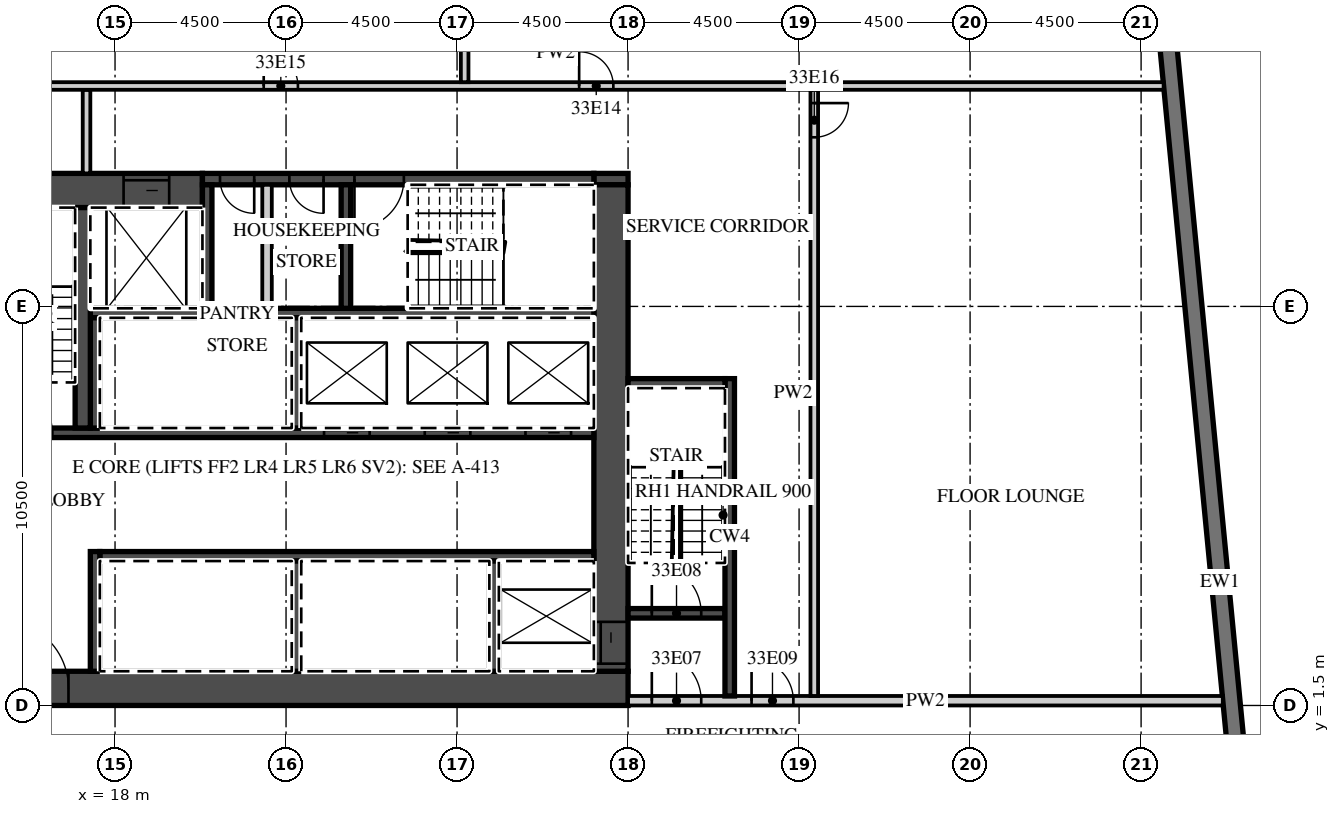
"""IFC4 building model, lengths in metres.
Left out: names, types, materials, properties, quantities, classifications, styles, units other than length and angle.
Written with IfcOpenShell. Run it as: python <this file> out.ifc"""

import sys

from ifc_helpers import new_model, si_unit, direction, frame, frame_2d, origin, place, context, subcontext, project, spatial, rectangle, extrude, element, fill, save


model = new_model("IFC4")
c1 = context("Model", 3, precision=1e-05, world=origin(), true_north=direction((0.0, 1.0)))
c2 = subcontext(c1, "Body", "Model", "MODEL_VIEW")
j1 = project(units=[si_unit("LENGTHUNIT", "METRE"), si_unit("PLANEANGLEUNIT", "RADIAN")], contexts=[c1])
p1 = place(None, origin())
s1 = spatial("IfcSite", under=j1, at=p1, CompositionType="ELEMENT")
p2 = place(p1, origin())
s2 = spatial("IfcBuilding", under=s1, at=p2, CompositionType="ELEMENT")
p3 = place(p2, frame((0.0, 0.0, 143.8)))
s3 = spatial("IfcBuildingStorey", under=s2, at=p3, CompositionType="ELEMENT", Elevation=143.8)
p4 = place(p3, frame((48.753, -12.672, 0.0), z_axis=(0.0, 0.0, 1.0), x_axis=(-0.095842661909, 0.995396495954, 0.0)))
e1 = element("IfcWall", 1, at=p4, inside=s3, PredefinedType="SOLIDWALL", context=c2, shape_type="SweptSolid", body=[
    extrude(rectangle(XDim=35.0, YDim=0.45, at=frame_2d((17.5, 0.0))), origin(), (0.0, 0.0, 1.0), 3.02),
])
p5 = place(p4, frame((3.072, 0.0, 0.45)))
e2 = element("IfcOpeningElement", 2, at=p5, cuts=e1, PredefinedType="OPENING", context=c2, shape_type="SweptSolid", body=[
    extrude(rectangle(XDim=3.3, YDim=2.25, at=frame_2d((1.65, 1.125))), frame((0.0, 0.235, 0.0), z_axis=(0.0, -1.0, 0.0), x_axis=(1.0, 0.0, 0.0)), (0.0, 0.0, 1.0), 0.47),
])
p6 = place(p4, frame((7.593, 0.0, 0.45)))
e3 = element("IfcOpeningElement", 3, at=p6, cuts=e1, PredefinedType="OPENING", context=c2, shape_type="SweptSolid", body=[
    extrude(rectangle(XDim=3.3, YDim=2.25, at=frame_2d((1.65, 1.125))), frame((0.0, 0.235, 0.0), z_axis=(0.0, -1.0, 0.0), x_axis=(1.0, 0.0, 0.0)), (0.0, 0.0, 1.0), 0.47),
])
p7 = place(p3, frame((13.5, 1.95, 0.0), z_axis=(0.0, 0.0, 1.0), x_axis=(1.0, 0.0, 0.0)))
e4 = element("IfcWall", 4, at=p7, inside=s3, PredefinedType="SHEAR", context=c2, shape_type="SweptSolid", body=[
    extrude(rectangle(XDim=18.0, YDim=0.9, at=frame_2d((9.0, 0.0))), origin(), (0.0, 0.0, 1.0), 3.02),
])
p8 = place(p7, frame((1.475, 0.0, 0.0)))
e5 = element("IfcOpeningElement", 5, at=p8, cuts=e4, PredefinedType="OPENING", context=c2, shape_type="SweptSolid", body=[
    extrude(rectangle(XDim=1.8, YDim=2.1, at=frame_2d((0.9, 1.05))), frame((0.0, 0.46, 0.0), z_axis=(0.0, -1.0, 0.0), x_axis=(1.0, 0.0, 0.0)), (0.0, 0.0, 1.0), 0.92),
])
p9 = place(p3, frame((13.5, 15.05, 0.0), z_axis=(0.0, 0.0, 1.0), x_axis=(1.0, 0.0, 0.0)))
e6 = element("IfcWall", 6, at=p9, inside=s3, PredefinedType="SHEAR", context=c2, shape_type="SweptSolid", body=[
    extrude(rectangle(XDim=6.8, YDim=0.9, at=frame_2d((3.4, 0.0))), origin(), (0.0, 0.0, 1.0), 3.02),
])
p10 = place(p9, frame((4.725, 0.0, 0.0)))
e7 = element("IfcOpeningElement", 7, at=p10, cuts=e6, PredefinedType="OPENING", context=c2, shape_type="SweptSolid", body=[
    extrude(rectangle(XDim=1.2, YDim=2.1, at=frame_2d((0.6, 1.05))), frame((0.0, 0.46, 0.0), z_axis=(0.0, -1.0, 0.0), x_axis=(1.0, 0.0, 0.0)), (0.0, 0.0, 1.0), 0.92),
])
p11 = place(p3, frame((30.6, 15.35, 0.0), z_axis=(0.0, 0.0, 1.0), x_axis=(1.0, 0.0, 0.0)))
e8 = element("IfcWall", 8, at=p11, inside=s3, PredefinedType="SHEAR", context=c2, shape_type="SweptSolid", body=[
    extrude(rectangle(XDim=0.9, YDim=0.3, at=frame_2d((0.45, 0.0))), origin(), (0.0, 0.0, 1.0), 3.02),
])
p12 = place(p3, frame((20.3, 15.35, 0.0), z_axis=(0.0, 0.0, 1.0), x_axis=(1.0, 0.0, 0.0)))
e9 = element("IfcWall", 9, at=p12, inside=s3, PredefinedType="SHEAR", context=c2, shape_type="SweptSolid", body=[
    extrude(rectangle(XDim=10.3, YDim=0.3, at=frame_2d((5.15, 0.0))), origin(), (0.0, 0.0, 1.0), 3.02),
])
p13 = place(p12, frame((4.0, 0.0, 0.0)))
e10 = element("IfcOpeningElement", 10, at=p13, cuts=e9, PredefinedType="OPENING", context=c2, shape_type="SweptSolid", body=[
    extrude(rectangle(XDim=1.3, YDim=2.1, at=frame_2d((0.65, 1.05))), frame((0.0, 0.16, 0.0), z_axis=(0.0, -1.0, 0.0), x_axis=(1.0, 0.0, 0.0)), (0.0, 0.0, 1.0), 0.32),
])
p14 = place(p12, frame((2.288, 0.0, 0.0)))
e11 = element("IfcOpeningElement", 11, at=p14, cuts=e9, PredefinedType="OPENING", context=c2, shape_type="SweptSolid", body=[
    extrude(rectangle(XDim=0.9, YDim=2.1, at=frame_2d((0.45, 1.05))), frame((0.0, 0.16, 0.0), z_axis=(0.0, -1.0, 0.0), x_axis=(1.0, 0.0, 0.0)), (0.0, 0.0, 1.0), 0.32),
])
p15 = place(p12, frame((0.462, 0.0, 0.0)))
e12 = element("IfcOpeningElement", 12, at=p15, cuts=e9, PredefinedType="OPENING", context=c2, shape_type="SweptSolid", body=[
    extrude(rectangle(XDim=0.9, YDim=2.1, at=frame_2d((0.45, 1.05))), frame((0.0, 0.16, 0.0), z_axis=(0.0, -1.0, 0.0), x_axis=(1.0, 0.0, 0.0)), (0.0, 0.0, 1.0), 0.32),
])
p16 = place(p3, frame((31.05, 2.4, 0.0), z_axis=(0.0, 0.0, 1.0), x_axis=(0.0, 1.0, 0.0)))
e13 = element("IfcWall", 13, at=p16, inside=s3, PredefinedType="SHEAR", context=c2, shape_type="SweptSolid", body=[
    extrude(rectangle(XDim=12.8, YDim=0.9, at=frame_2d((6.4, 0.0))), origin(), (0.0, 0.0, 1.0), 3.02),
])
p17 = place(p16, frame((0.2, 0.0, 0.0)))
e14 = element("IfcOpeningElement", 14, at=p17, cuts=e13, PredefinedType="OPENING", context=c2, shape_type="SweptSolid", body=[
    extrude(rectangle(XDim=1.1, YDim=2.1, at=frame_2d((0.55, 1.05))), frame((0.0, 0.46, 0.0), z_axis=(0.0, -1.0, 0.0), x_axis=(1.0, 0.0, 0.0)), (0.0, 0.0, 1.0), 0.92),
])
p18 = place(p3, frame((17.6, 5.425, 0.0), z_axis=(0.0, 0.0, 1.0), x_axis=(1.0, 0.0, 0.0)))
e15 = element("IfcWall", 15, at=p18, inside=s3, PredefinedType="SHEAR", context=c2, shape_type="SweptSolid", body=[
    extrude(rectangle(XDim=13.0, YDim=0.25, at=frame_2d((6.5, 0.0))), origin(), (0.0, 0.0, 1.0), 3.02),
])
p19 = place(p3, frame((17.475, 2.4, 0.0), z_axis=(0.0, 0.0, 1.0), x_axis=(0.0, 1.0, 0.0)))
e16 = element("IfcWall", 16, at=p19, inside=s3, PredefinedType="SHEAR", context=c2, shape_type="SweptSolid", body=[
    extrude(rectangle(XDim=3.15, YDim=0.25, at=frame_2d((1.575, 0.0))), origin(), (0.0, 0.0, 1.0), 3.02),
])
for number, where, z_axis, x_axis in (
    (17, (27.975, 2.4, 0.0), (0.0, 0.0, 1.0), (0.0, 1.0, 0.0)),
    (18, (22.775, 2.4, 0.0), (0.0, 0.0, 1.0), (0.0, 1.0, 0.0)),
):
    element("IfcWall", number, at=place(p3, frame(where, z_axis=z_axis, x_axis=x_axis)), inside=s3, PredefinedType="SHEAR", context=c2, shape_type="SweptSolid", body=[
        extrude(rectangle(XDim=2.9, YDim=0.25, at=frame_2d((1.45, 0.0))), origin(), (0.0, 0.0, 1.0), 3.02),
    ])
p20 = place(p3, frame((14.4, 8.675, 0.0), z_axis=(0.0, 0.0, 1.0), x_axis=(1.0, 0.0, 0.0)))
e19 = element("IfcWall", 19, at=p20, inside=s3, PredefinedType="SHEAR", context=c2, shape_type="SweptSolid", body=[
    extrude(rectangle(XDim=16.2, YDim=0.25, at=frame_2d((8.1, 0.0))), origin(), (0.0, 0.0, 1.0), 3.02),
])
p21 = place(p20, frame((14.4, 0.0, 0.0)))
e20 = element("IfcOpeningElement", 20, at=p21, cuts=e19, PredefinedType="OPENING", context=c2, shape_type="SweptSolid", body=[
    extrude(rectangle(XDim=1.2, YDim=2.1, at=frame_2d((0.6, 1.05))), frame((0.0, 0.135, 0.0), z_axis=(0.0, -1.0, 0.0), x_axis=(1.0, 0.0, 0.0)), (0.0, 0.0, 1.0), 0.27),
])
p22 = place(p20, frame((11.75, 0.0, 0.0)))
e21 = element("IfcOpeningElement", 21, at=p22, cuts=e19, PredefinedType="OPENING", context=c2, shape_type="SweptSolid", body=[
    extrude(rectangle(XDim=1.2, YDim=2.1, at=frame_2d((0.6, 1.05))), frame((0.0, 0.135, 0.0), z_axis=(0.0, -1.0, 0.0), x_axis=(1.0, 0.0, 0.0)), (0.0, 0.0, 1.0), 0.27),
])
p23 = place(p20, frame((9.1, 0.0, 0.0)))
e22 = element("IfcOpeningElement", 22, at=p23, cuts=e19, PredefinedType="OPENING", context=c2, shape_type="SweptSolid", body=[
    extrude(rectangle(XDim=1.2, YDim=2.1, at=frame_2d((0.6, 1.05))), frame((0.0, 0.135, 0.0), z_axis=(0.0, -1.0, 0.0), x_axis=(1.0, 0.0, 0.0)), (0.0, 0.0, 1.0), 0.27),
])
p24 = place(p20, frame((0.65, 0.0, 0.0)))
e23 = element("IfcOpeningElement", 23, at=p24, cuts=e19, PredefinedType="OPENING", context=c2, shape_type="SweptSolid", body=[
    extrude(rectangle(XDim=1.3, YDim=2.1, at=frame_2d((0.65, 1.05))), frame((0.0, 0.135, 0.0), z_axis=(0.0, -1.0, 0.0), x_axis=(1.0, 0.0, 0.0)), (0.0, 0.0, 1.0), 0.27),
])
p25 = place(p3, frame((17.35, 11.825, 0.0), z_axis=(0.0, 0.0, 1.0), x_axis=(1.0, 0.0, 0.0)))
e24 = element("IfcWall", 24, at=p25, inside=s3, PredefinedType="SHEAR", context=c2, shape_type="SweptSolid", body=[
    extrude(rectangle(XDim=13.25, YDim=0.25, at=frame_2d((6.625, 0.0))), origin(), (0.0, 0.0, 1.0), 3.02),
])
for number, where, z_axis, x_axis in (
    (25, (17.475, 8.8, 0.0), (0.0, 0.0, 1.0), (0.0, 1.0, 0.0)),
    (26, (22.775, 8.8, 0.0), (0.0, 0.0, 1.0), (0.0, 1.0, 0.0)),
):
    element("IfcWall", number, at=place(p3, frame(where, z_axis=z_axis, x_axis=x_axis)), inside=s3, PredefinedType="SHEAR", context=c2, shape_type="SweptSolid", body=[
        extrude(rectangle(XDim=2.9, YDim=0.25, at=frame_2d((1.45, 0.0))), origin(), (0.0, 0.0, 1.0), 3.02),
    ])
p26 = place(p3, frame((17.15, 8.8, 0.0), z_axis=(0.0, 0.0, 1.0), x_axis=(0.0, 1.0, 0.0)))
e27 = element("IfcWall", 27, at=p26, inside=s3, PredefinedType="SHEAR", context=c2, shape_type="SweptSolid", body=[
    extrude(rectangle(XDim=5.8, YDim=0.4, at=frame_2d((2.9, 0.0))), origin(), (0.0, 0.0, 1.0), 3.02),
])
for number, where, z_axis, x_axis in (
    (28, (20.425, 11.95, 0.0), (0.0, 0.0, 1.0), (0.0, 1.0, 0.0)),
    (29, (24.075, 11.95, 0.0), (0.0, 0.0, 1.0), (0.0, 1.0, 0.0)),
):
    element("IfcWall", number, at=place(p3, frame(where, z_axis=z_axis, x_axis=x_axis)), inside=s3, PredefinedType="SHEAR", context=c2, shape_type="SweptSolid", body=[
        extrude(rectangle(XDim=3.25, YDim=0.25, at=frame_2d((1.625, 0.0))), origin(), (0.0, 0.0, 1.0), 3.02),
    ])
p27 = place(p3, frame((22.0, 11.95, 0.0), z_axis=(0.0, 0.0, 1.0), x_axis=(0.0, 1.0, 0.0)))
e30 = element("IfcWall", 30, at=p27, inside=s3, PredefinedType="PARTITIONING", context=c2, shape_type="SweptSolid", body=[
    extrude(rectangle(XDim=3.25, YDim=0.25, at=frame_2d((1.625, 0.0))), origin(), (0.0, 0.0, 1.0), 3.02),
])
p28 = place(p3, frame((31.5, 1.625, 0.0), z_axis=(0.0, 0.0, 1.0), x_axis=(1.0, 0.0, 0.0)))
e31 = element("IfcWall", 31, at=p28, inside=s3, PredefinedType="PARTITIONING", context=c2, shape_type="SweptSolid", body=[
    extrude(rectangle(XDim=15.65, YDim=0.25, at=frame_2d((7.825, 0.0))), origin(), (0.0, 0.0, 1.0), 3.02),
])
p29 = place(p28, frame((0.625, 0.0, 0.0)))
e32 = element("IfcOpeningElement", 32, at=p29, cuts=e31, PredefinedType="OPENING", context=c2, shape_type="SweptSolid", body=[
    extrude(rectangle(XDim=1.3, YDim=2.1, at=frame_2d((0.65, 1.05))), frame((0.0, 0.135, 0.0), z_axis=(0.0, -1.0, 0.0), x_axis=(1.0, 0.0, 0.0)), (0.0, 0.0, 1.0), 0.27),
])
p30 = place(p28, frame((3.25, 0.0, 0.0)))
e33 = element("IfcOpeningElement", 33, at=p30, cuts=e31, PredefinedType="OPENING", context=c2, shape_type="SweptSolid", body=[
    extrude(rectangle(XDim=1.1, YDim=2.1, at=frame_2d((0.55, 1.05))), frame((0.0, 0.135, 0.0), z_axis=(0.0, -1.0, 0.0), x_axis=(1.0, 0.0, 0.0)), (0.0, 0.0, 1.0), 0.27),
])
p31 = place(p3, frame((31.5, 3.925, 0.0), z_axis=(0.0, 0.0, 1.0), x_axis=(1.0, 0.0, 0.0)))
e34 = element("IfcWall", 34, at=p31, inside=s3, PredefinedType="SHEAR", context=c2, shape_type="SweptSolid", body=[
    extrude(rectangle(XDim=2.55, YDim=0.25, at=frame_2d((1.275, 0.0))), origin(), (0.0, 0.0, 1.0), 3.02),
])
p32 = place(p31, frame((0.625, 0.0, 0.0)))
e35 = element("IfcOpeningElement", 35, at=p32, cuts=e34, PredefinedType="OPENING", context=c2, shape_type="SweptSolid", body=[
    extrude(rectangle(XDim=1.3, YDim=2.1, at=frame_2d((0.65, 1.05))), frame((0.0, 0.135, 0.0), z_axis=(0.0, -1.0, 0.0), x_axis=(1.0, 0.0, 0.0)), (0.0, 0.0, 1.0), 0.27),
])
p33 = place(p3, frame((34.175, 1.75, 0.0), z_axis=(0.0, 0.0, 1.0), x_axis=(0.0, 1.0, 0.0)))
e36 = element("IfcWall", 36, at=p33, inside=s3, PredefinedType="SHEAR", context=c2, shape_type="SweptSolid", body=[
    extrude(rectangle(XDim=8.35, YDim=0.25, at=frame_2d((4.175, 0.0))), origin(), (0.0, 0.0, 1.0), 3.02),
])
p34 = place(p3, frame((31.5, 9.975, 0.0), z_axis=(0.0, 0.0, 1.0), x_axis=(1.0, 0.0, 0.0)))
e37 = element("IfcWall", 37, at=p34, inside=s3, PredefinedType="SHEAR", context=c2, shape_type="SweptSolid", body=[
    extrude(rectangle(XDim=2.55, YDim=0.25, at=frame_2d((1.275, 0.0))), origin(), (0.0, 0.0, 1.0), 3.02),
])
p35 = place(p3, frame((17.25, 15.5, 0.0), z_axis=(0.0, 0.0, 1.0), x_axis=(0.0, 1.0, 0.0)))
e38 = element("IfcWall", 38, at=p35, inside=s3, PredefinedType="PARTITIONING", context=c2, shape_type="SweptSolid", body=[
    extrude(rectangle(XDim=2.2, YDim=0.2, at=frame_2d((1.1, 0.0))), origin(), (0.0, 0.0, 1.0), 3.02),
])
p36 = place(p3, frame((36.4, 1.75, 0.0), z_axis=(0.0, 0.0, 1.0), x_axis=(0.0, 1.0, 0.0)))
e39 = element("IfcWall", 39, at=p36, inside=s3, PredefinedType="PARTITIONING", context=c2, shape_type="SweptSolid", body=[
    extrude(rectangle(XDim=15.95, YDim=0.2, at=frame_2d((7.975, 0.0))), origin(), (0.0, 0.0, 1.0), 3.02),
])
p37 = place(p36, frame((14.7, 0.0, 0.0)))
e40 = element("IfcOpeningElement", 40, at=p37, cuts=e39, PredefinedType="OPENING", context=c2, shape_type="SweptSolid", body=[
    extrude(rectangle(XDim=0.9, YDim=2.1, at=frame_2d((0.45, 1.05))), frame((0.0, 0.11, 0.0), z_axis=(0.0, -1.0, 0.0), x_axis=(1.0, 0.0, 0.0)), (0.0, 0.0, 1.0), 0.22),
])
p38 = place(p3, frame((13.6, 17.8, 0.0), z_axis=(0.0, 0.0, 1.0), x_axis=(1.0, 0.0, 0.0)))
e41 = element("IfcWall", 41, at=p38, inside=s3, PredefinedType="PARTITIONING", context=c2, shape_type="SweptSolid", body=[
    extrude(rectangle(XDim=31.993, YDim=0.2, at=frame_2d((15.997, 0.0))), origin(), (0.0, 0.0, 1.0), 3.02),
])
p39 = place(p38, frame((16.613, 0.0, 0.0)))
e42 = element("IfcOpeningElement", 42, at=p39, cuts=e41, PredefinedType="OPENING", context=c2, shape_type="SweptSolid", body=[
    extrude(rectangle(XDim=0.9, YDim=2.1, at=frame_2d((0.45, 1.05))), frame((0.0, 0.11, 0.0), z_axis=(0.0, -1.0, 0.0), x_axis=(1.0, 0.0, 0.0)), (0.0, 0.0, 1.0), 0.22),
])
p40 = place(p38, frame((8.312, 0.0, 0.0)))
e43 = element("IfcOpeningElement", 43, at=p40, cuts=e41, PredefinedType="OPENING", context=c2, shape_type="SweptSolid", body=[
    extrude(rectangle(XDim=0.9, YDim=2.1, at=frame_2d((0.45, 1.05))), frame((0.0, 0.11, 0.0), z_axis=(0.0, -1.0, 0.0), x_axis=(1.0, 0.0, 0.0)), (0.0, 0.0, 1.0), 0.22),
])
p41 = place(p3, frame((27.2, 17.9, 0.0), z_axis=(0.0, 0.0, 1.0), x_axis=(0.0, 1.0, 0.0)))
e44 = element("IfcWall", 44, at=p41, inside=s3, PredefinedType="PARTITIONING", context=c2, shape_type="SweptSolid", body=[
    extrude(rectangle(XDim=6.082, YDim=0.2, at=frame_2d((3.041, 0.0))), origin(), (0.0, 0.0, 1.0), 3.02),
])
p42 = place(p21, origin())
e45 = element("IfcDoor", 45, at=p42, inside=s3, OperationType="SLIDING_TO_LEFT", PredefinedType="DOOR", context=c2, shape_type="SweptSolid", body=[
    extrude(rectangle(XDim=1.2, YDim=2.1, at=frame_2d((0.6, 1.05))), frame((0.0, 0.025, 0.0), z_axis=(0.0, -1.0, 0.0), x_axis=(1.0, 0.0, 0.0)), (0.0, 0.0, 1.0), 0.05),
])
fill(e20, e45)
p43 = place(p22, origin())
e46 = element("IfcDoor", 46, at=p43, inside=s3, OperationType="SLIDING_TO_RIGHT", PredefinedType="DOOR", context=c2, shape_type="SweptSolid", body=[
    extrude(rectangle(XDim=1.2, YDim=2.1, at=frame_2d((0.6, 1.05))), frame((0.0, 0.025, 0.0), z_axis=(0.0, -1.0, 0.0), x_axis=(1.0, 0.0, 0.0)), (0.0, 0.0, 1.0), 0.05),
])
fill(e21, e46)
p44 = place(p23, origin())
e47 = element("IfcDoor", 47, at=p44, inside=s3, OperationType="SLIDING_TO_RIGHT", PredefinedType="DOOR", context=c2, shape_type="SweptSolid", body=[
    extrude(rectangle(XDim=1.2, YDim=2.1, at=frame_2d((0.6, 1.05))), frame((0.0, 0.025, 0.0), z_axis=(0.0, -1.0, 0.0), x_axis=(1.0, 0.0, 0.0)), (0.0, 0.0, 1.0), 0.05),
])
fill(e22, e47)
p45 = place(p10, origin())
e48 = element("IfcDoor", 48, at=p45, inside=s3, OperationType="SLIDING_TO_LEFT", PredefinedType="DOOR", context=c2, shape_type="SweptSolid", body=[
    extrude(rectangle(XDim=1.2, YDim=2.1, at=frame_2d((0.6, 1.05))), frame((0.0, 0.025, 0.0), z_axis=(0.0, -1.0, 0.0), x_axis=(1.0, 0.0, 0.0)), (0.0, 0.0, 1.0), 0.05),
])
fill(e7, e48)
p46 = place(p17, origin())
e49 = element("IfcDoor", 49, at=p46, inside=s3, OperationType="SLIDING_TO_LEFT", PredefinedType="DOOR", context=c2, shape_type="SweptSolid", body=[
    extrude(rectangle(XDim=1.1, YDim=2.1, at=frame_2d((0.55, 1.05))), frame((0.0, 0.025, 0.0), z_axis=(0.0, -1.0, 0.0), x_axis=(1.0, 0.0, 0.0)), (0.0, 0.0, 1.0), 0.05),
])
fill(e14, e49)
p47 = place(p8, origin())
e50 = element("IfcDoor", 50, at=p47, inside=s3, OperationType="DOUBLE_DOOR_DOUBLE_SWING", PredefinedType="DOOR", context=c2, shape_type="SweptSolid", body=[
    extrude(rectangle(XDim=1.8, YDim=2.1, at=frame_2d((0.9, 1.05))), frame((0.0, 0.025, 0.0), z_axis=(0.0, -1.0, 0.0), x_axis=(1.0, 0.0, 0.0)), (0.0, 0.0, 1.0), 0.05),
])
fill(e5, e50)
p48 = place(p29, origin())
e51 = element("IfcDoor", 51, at=p48, inside=s3, OperationType="SINGLE_SWING_LEFT", PredefinedType="DOOR", context=c2, shape_type="SweptSolid", body=[
    extrude(rectangle(XDim=1.3, YDim=2.1, at=frame_2d((0.65, 1.05))), frame((0.0, 0.025, 0.0), z_axis=(0.0, -1.0, 0.0), x_axis=(1.0, 0.0, 0.0)), (0.0, 0.0, 1.0), 0.05),
])
fill(e32, e51)
p49 = place(p32, origin())
e52 = element("IfcDoor", 52, at=p49, inside=s3, OperationType="SINGLE_SWING_LEFT", PredefinedType="DOOR", context=c2, shape_type="SweptSolid", body=[
    extrude(rectangle(XDim=1.3, YDim=2.1, at=frame_2d((0.65, 1.05))), frame((0.0, 0.025, 0.0), z_axis=(0.0, -1.0, 0.0), x_axis=(1.0, 0.0, 0.0)), (0.0, 0.0, 1.0), 0.05),
])
fill(e35, e52)
p50 = place(p30, origin())
e53 = element("IfcDoor", 53, at=p50, inside=s3, OperationType="SINGLE_SWING_LEFT", PredefinedType="DOOR", context=c2, shape_type="SweptSolid", body=[
    extrude(rectangle(XDim=1.1, YDim=2.1, at=frame_2d((0.55, 1.05))), frame((0.0, 0.025, 0.0), z_axis=(0.0, -1.0, 0.0), x_axis=(1.0, 0.0, 0.0)), (0.0, 0.0, 1.0), 0.05),
])
fill(e33, e53)
p51 = place(p13, origin())
e54 = element("IfcDoor", 54, at=p51, inside=s3, OperationType="SINGLE_SWING_LEFT", PredefinedType="DOOR", context=c2, shape_type="SweptSolid", body=[
    extrude(rectangle(XDim=1.3, YDim=2.1, at=frame_2d((0.65, 1.05))), frame((0.0, 0.025, 0.0), z_axis=(0.0, -1.0, 0.0), x_axis=(1.0, 0.0, 0.0)), (0.0, 0.0, 1.0), 0.05),
])
fill(e10, e54)
p52 = place(p14, origin())
e55 = element("IfcDoor", 55, at=p52, inside=s3, OperationType="SINGLE_SWING_RIGHT", PredefinedType="DOOR", context=c2, shape_type="SweptSolid", body=[
    extrude(rectangle(XDim=0.9, YDim=2.1, at=frame_2d((0.45, 1.05))), frame((0.0, 0.025, 0.0), z_axis=(0.0, -1.0, 0.0), x_axis=(1.0, 0.0, 0.0)), (0.0, 0.0, 1.0), 0.05),
])
fill(e11, e55)
p53 = place(p15, origin())
e56 = element("IfcDoor", 56, at=p53, inside=s3, OperationType="SINGLE_SWING_RIGHT", PredefinedType="DOOR", context=c2, shape_type="SweptSolid", body=[
    extrude(rectangle(XDim=0.9, YDim=2.1, at=frame_2d((0.45, 1.05))), frame((0.0, 0.025, 0.0), z_axis=(0.0, -1.0, 0.0), x_axis=(1.0, 0.0, 0.0)), (0.0, 0.0, 1.0), 0.05),
])
fill(e12, e56)
p54 = place(p39, origin())
e57 = element("IfcDoor", 57, at=p54, inside=s3, OperationType="SINGLE_SWING_LEFT", PredefinedType="DOOR", context=c2, shape_type="SweptSolid", body=[
    extrude(rectangle(XDim=0.9, YDim=2.1, at=frame_2d((0.45, 1.05))), frame((0.0, 0.025, 0.0), z_axis=(0.0, -1.0, 0.0), x_axis=(1.0, 0.0, 0.0)), (0.0, 0.0, 1.0), 0.05),
])
fill(e42, e57)
p55 = place(p40, origin())
e58 = element("IfcDoor", 58, at=p55, inside=s3, OperationType="SINGLE_SWING_LEFT", PredefinedType="DOOR", context=c2, shape_type="SweptSolid", body=[
    extrude(rectangle(XDim=0.9, YDim=2.1, at=frame_2d((0.45, 1.05))), frame((0.0, 0.025, 0.0), z_axis=(0.0, -1.0, 0.0), x_axis=(1.0, 0.0, 0.0)), (0.0, 0.0, 1.0), 0.05),
])
fill(e43, e58)
p56 = place(p37, origin())
e59 = element("IfcDoor", 59, at=p56, inside=s3, OperationType="SINGLE_SWING_RIGHT", PredefinedType="DOOR", context=c2, shape_type="SweptSolid", body=[
    extrude(rectangle(XDim=0.9, YDim=2.1, at=frame_2d((0.45, 1.05))), frame((0.0, 0.025, 0.0), z_axis=(0.0, -1.0, 0.0), x_axis=(1.0, 0.0, 0.0)), (0.0, 0.0, 1.0), 0.05),
])
fill(e40, e59)
save(model, sys.argv[1])
